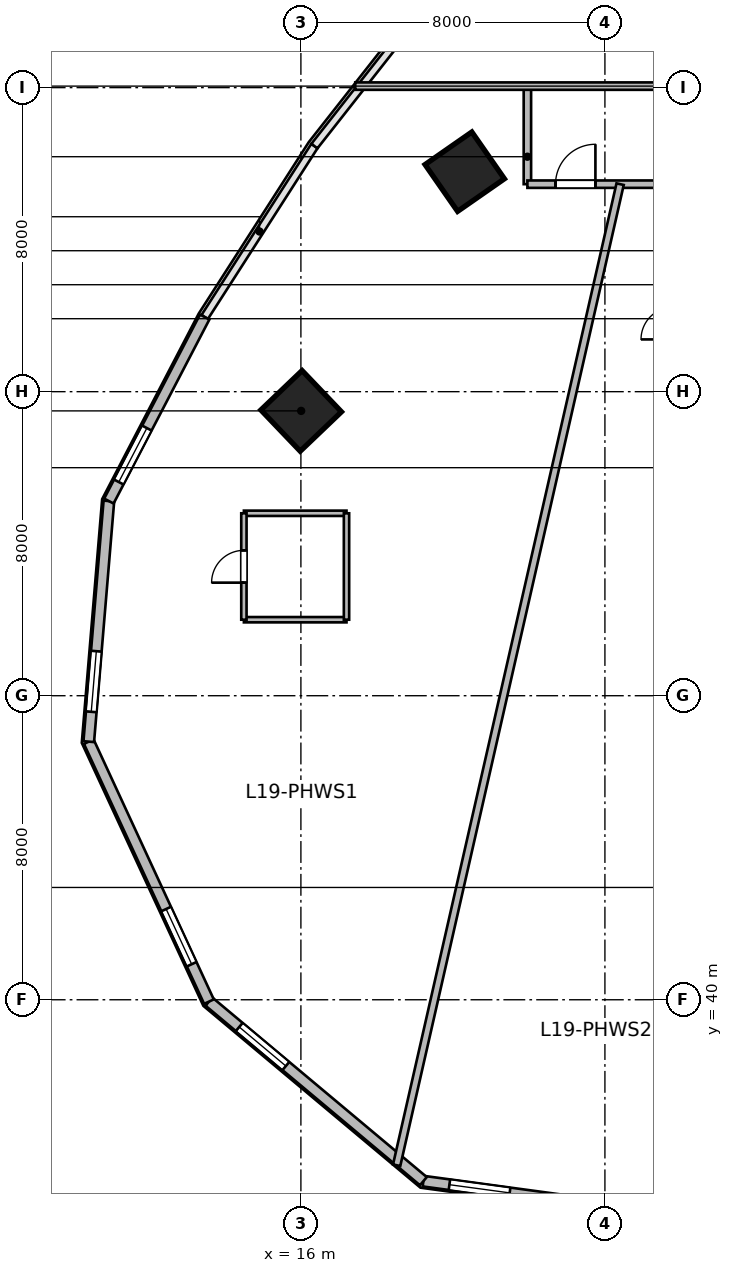
"""IFC4 building model, lengths in metres.
Left out: names, types, materials, properties, quantities, classifications, styles, units other than length and angle.
Written with IfcOpenShell. Run it as: python <this file> out.ifc"""

import sys

from ifc_helpers import new_model, si_unit, direction, frame, frame_2d, origin, origin_2d, place, context, subcontext, project, spatial, rectangle, extrude, source, transform, mapped, element, fill, save


model = new_model("IFC4")
c1 = context("Model", 3, precision=1e-05, world=origin(), true_north=direction((0.0, 1.0)))
c2 = subcontext(c1, "Body", "Model", "MODEL_VIEW")
j1 = project(units=[si_unit("LENGTHUNIT", "METRE"), si_unit("PLANEANGLEUNIT", "RADIAN")], contexts=[c1])
p1 = place(None, origin())
s1 = spatial("IfcSite", under=j1, at=p1, CompositionType="ELEMENT")
p2 = place(p1, origin())
s2 = spatial("IfcBuilding", under=s1, at=p2, CompositionType="ELEMENT")
p3 = place(p2, frame((0.0, 0.0, 82.2)))
s3 = spatial("IfcBuildingStorey", under=s2, at=p3, CompositionType="ELEMENT", Elevation=82.2)
m1 = source(origin(), c2, "Body", "SweptSolid", [
    extrude(rectangle(XDim=1.5, YDim=1.5, at=origin_2d()), origin(), (0.0, 0.0, 1.0), 3.6),
])
for number, where, z_axis, x_axis in (
    (1, (16.007, 55.494, 0.0), (0.0, 0.0, 1.0), (-0.691, 0.723, 0.0)),
    (2, (20.311, 61.789, 0.0), (0.0, 0.0, 1.0), (-0.571, 0.821, 0.0)),
):
    element("IfcColumn", number, at=place(p3, frame(where, z_axis=z_axis, x_axis=x_axis)), inside=s3, PredefinedType="COLUMN", context=c2, shape_type="MappedRepresentation", body=[
        mapped(m1, transform((0.0, 0.0, 0.0), scale=1.0)),
    ])
m2 = source(origin(), c2, "Body", "SweptSolid", [
    extrude(rectangle(XDim=5.222, YDim=0.28, at=frame_2d((2.611, 0.0))), origin(), (0.0, 0.0, 1.0), 3.28),
])
p4 = place(p3, frame((29.115, 37.807, 0.0), z_axis=(0.0, 0.0, 1.0), x_axis=(-0.761900099546, -0.647694556339, 0.0)))
e3 = element("IfcWall", 3, at=p4, inside=s3, PredefinedType="SOLIDWALL", context=c2, shape_type="MappedRepresentation", body=[
    mapped(m2, transform((0.0, 0.0, 0.0), scale=1.0)),
])
p5 = place(p4, frame((3.117, 0.0, 0.95)))
e4 = element("IfcOpeningElement", 4, at=p5, cuts=e3, PredefinedType="OPENING", context=c2, shape_type="SweptSolid", body=[
    extrude(rectangle(XDim=1.6, YDim=1.9, at=frame_2d((0.8, 0.95))), frame((0.0, 0.15, 0.0), z_axis=(0.0, -1.0, 0.0), x_axis=(1.0, 0.0, 0.0)), (0.0, 0.0, 1.0), 0.3),
])
m3 = source(origin(), c2, "Body", "SweptSolid", [
    extrude(rectangle(XDim=5.967, YDim=0.28, at=frame_2d((2.984, 0.0))), origin(), (0.0, 0.0, 1.0), 3.28),
])
p6 = place(p3, frame((25.136, 34.425, 0.0), z_axis=(0.0, 0.0, 1.0), x_axis=(-0.990927009341, 0.134401124099, 0.0)))
e5 = element("IfcWall", 5, at=p6, inside=s3, PredefinedType="SOLIDWALL", context=c2, shape_type="MappedRepresentation", body=[
    mapped(m3, transform((0.0, 0.0, 0.0), scale=1.0)),
])
p7 = place(p6, frame((3.676, 0.0, 0.95)))
e6 = element("IfcOpeningElement", 6, at=p7, cuts=e5, PredefinedType="OPENING", context=c2, shape_type="SweptSolid", body=[
    extrude(rectangle(XDim=1.6, YDim=1.9, at=frame_2d((0.8, 0.95))), frame((0.0, 0.15, 0.0), z_axis=(0.0, -1.0, 0.0), x_axis=(1.0, 0.0, 0.0)), (0.0, 0.0, 1.0), 0.3),
])
m4 = source(origin(), c2, "Body", "SweptSolid", [
    extrude(rectangle(XDim=7.359, YDim=0.28, at=frame_2d((3.679, 0.0))), origin(), (0.0, 0.0, 1.0), 3.28),
])
p8 = place(p3, frame((19.223, 35.227, 0.0), z_axis=(0.0, 0.0, 1.0), x_axis=(-0.766737165543, 0.641961150675, 0.0)))
e7 = element("IfcWall", 7, at=p8, inside=s3, PredefinedType="SOLIDWALL", context=c2, shape_type="MappedRepresentation", body=[
    mapped(m4, transform((0.0, 0.0, 0.0), scale=1.0)),
])
p9 = place(p8, frame((4.719, 0.0, 0.95)))
e8 = element("IfcOpeningElement", 8, at=p9, cuts=e7, PredefinedType="OPENING", context=c2, shape_type="SweptSolid", body=[
    extrude(rectangle(XDim=1.6, YDim=1.9, at=frame_2d((0.8, 0.95))), frame((0.0, 0.15, 0.0), z_axis=(0.0, -1.0, 0.0), x_axis=(1.0, 0.0, 0.0)), (0.0, 0.0, 1.0), 0.3),
])
m5 = source(origin(), c2, "Body", "SweptSolid", [
    extrude(rectangle(XDim=7.536, YDim=0.28, at=frame_2d((3.768, 0.0))), origin(), (0.0, 0.0, 1.0), 3.28),
])
p10 = place(p3, frame((13.58, 39.951, 0.0), z_axis=(0.0, 0.0, 1.0), x_axis=(-0.41964973873, 0.907686122393, 0.0)))
e9 = element("IfcWall", 9, at=p10, inside=s3, PredefinedType="SOLIDWALL", context=c2, shape_type="MappedRepresentation", body=[
    mapped(m5, transform((0.0, 0.0, 0.0), scale=1.0)),
])
p11 = place(p10, frame((1.084, 0.0, 0.95)))
e10 = element("IfcOpeningElement", 10, at=p11, cuts=e9, PredefinedType="OPENING", context=c2, shape_type="SweptSolid", body=[
    extrude(rectangle(XDim=1.6, YDim=1.9, at=frame_2d((0.8, 0.95))), frame((0.0, 0.15, 0.0), z_axis=(0.0, -1.0, 0.0), x_axis=(1.0, 0.0, 0.0)), (0.0, 0.0, 1.0), 0.3),
])
m6 = source(origin(), c2, "Body", "SweptSolid", [
    extrude(rectangle(XDim=6.353, YDim=0.28, at=frame_2d((3.176, 0.0))), origin(), (0.0, 0.0, 1.0), 3.28),
])
p12 = place(p3, frame((10.418, 46.792, 0.0), z_axis=(0.0, 0.0, 1.0), x_axis=(0.083319001377, 0.996522926986, 0.0)))
e11 = element("IfcWall", 11, at=p12, inside=s3, PredefinedType="SOLIDWALL", context=c2, shape_type="MappedRepresentation", body=[
    mapped(m6, transform((0.0, 0.0, 0.0), scale=1.0)),
])
p13 = place(p12, frame((0.788, 0.0, 0.95)))
e12 = element("IfcOpeningElement", 12, at=p13, cuts=e11, PredefinedType="OPENING", context=c2, shape_type="SweptSolid", body=[
    extrude(rectangle(XDim=1.6, YDim=1.9, at=frame_2d((0.8, 0.95))), frame((0.0, 0.15, 0.0), z_axis=(0.0, -1.0, 0.0), x_axis=(1.0, 0.0, 0.0)), (0.0, 0.0, 1.0), 0.3),
])
m7 = source(origin(), c2, "Body", "SweptSolid", [
    extrude(rectangle(XDim=5.459, YDim=0.28, at=frame_2d((2.73, 0.0))), origin(), (0.0, 0.0, 1.0), 3.28),
])
p14 = place(p3, frame((10.947, 53.122, 0.0), z_axis=(0.0, 0.0, 1.0), x_axis=(0.461768054321, 0.887000712518, 0.0)))
e13 = element("IfcWall", 13, at=p14, inside=s3, PredefinedType="SOLIDWALL", context=c2, shape_type="MappedRepresentation", body=[
    mapped(m7, transform((0.0, 0.0, 0.0), scale=1.0)),
])
p15 = place(p14, frame((0.565, 0.0, 0.95)))
e14 = element("IfcOpeningElement", 14, at=p15, cuts=e13, PredefinedType="OPENING", context=c2, shape_type="SweptSolid", body=[
    extrude(rectangle(XDim=1.6, YDim=1.9, at=frame_2d((0.8, 0.95))), frame((0.0, 0.15, 0.0), z_axis=(0.0, -1.0, 0.0), x_axis=(1.0, 0.0, 0.0)), (0.0, 0.0, 1.0), 0.3),
])
m8 = source(origin(), c2, "Body", "SweptSolid", [
    extrude(rectangle(XDim=2.58, YDim=0.195, at=frame_2d((1.29, 0.0))), origin(), (0.0, 0.0, 1.0), 3.28),
])
p16 = place(p3, frame((21.96, 61.46, 0.0), z_axis=(0.0, 0.0, 1.0), x_axis=(0.0, 1.0, 0.0)))
e15 = element("IfcWall", 15, at=p16, inside=s3, PredefinedType="PARTITIONING", context=c2, shape_type="MappedRepresentation", body=[
    mapped(m8, transform((0.0, 0.0, 0.0), scale=1.0)),
])
m9 = source(origin(), c2, "Body", "SweptSolid", [
    extrude(rectangle(XDim=16.93, YDim=0.195, at=frame_2d((8.465, 0.0))), origin(), (0.0, 0.0, 1.0), 3.28),
])
p17 = place(p3, frame((17.43, 64.04, 0.0), z_axis=(0.0, 0.0, 1.0), x_axis=(1.0, 0.0, 0.0)))
e16 = element("IfcWall", 16, at=p17, inside=s3, PredefinedType="PARTITIONING", context=c2, shape_type="MappedRepresentation", body=[
    mapped(m9, transform((0.0, 0.0, 0.0), scale=1.0)),
])
p18 = place(p17, frame((7.94, 0.0, 0.0)))
e17 = element("IfcOpeningElement", 17, at=p18, cuts=e16, PredefinedType="OPENING", context=c2, shape_type="SweptSolid", body=[
    extrude(rectangle(XDim=1.05, YDim=2.15, at=frame_2d((0.525, 1.075))), frame((0.0, 0.107, 0.0), z_axis=(0.0, -1.0, 0.0), x_axis=(1.0, 0.0, 0.0)), (0.0, 0.0, 1.0), 0.215),
])
m10 = source(origin(), c2, "Body", "SweptSolid", [
    extrude(rectangle(XDim=12.4, YDim=0.195, at=frame_2d((6.2, 0.0))), origin(), (0.0, 0.0, 1.0), 3.28),
])
p19 = place(p3, frame((21.96, 61.46, 0.0), z_axis=(0.0, 0.0, 1.0), x_axis=(1.0, 0.0, 0.0)))
e18 = element("IfcWall", 18, at=p19, inside=s3, PredefinedType="PARTITIONING", context=c2, shape_type="MappedRepresentation", body=[
    mapped(m10, transform((0.0, 0.0, 0.0), scale=1.0)),
])
p20 = place(p19, frame((0.74, 0.0, 0.0)))
e19 = element("IfcOpeningElement", 19, at=p20, cuts=e18, PredefinedType="OPENING", context=c2, shape_type="SweptSolid", body=[
    extrude(rectangle(XDim=1.05, YDim=2.15, at=frame_2d((0.525, 1.075))), frame((0.0, 0.107, 0.0), z_axis=(0.0, -1.0, 0.0), x_axis=(1.0, 0.0, 0.0)), (0.0, 0.0, 1.0), 0.215),
])
p21 = place(p19, frame((5.675, 0.0, 0.0)))
e20 = element("IfcOpeningElement", 20, at=p21, cuts=e18, PredefinedType="OPENING", context=c2, shape_type="SweptSolid", body=[
    extrude(rectangle(XDim=1.05, YDim=2.15, at=frame_2d((0.525, 1.075))), frame((0.0, 0.107, 0.0), z_axis=(0.0, -1.0, 0.0), x_axis=(1.0, 0.0, 0.0)), (0.0, 0.0, 1.0), 0.215),
])
p22 = place(p19, frame((7.74, 0.0, 0.0)))
e21 = element("IfcOpeningElement", 21, at=p22, cuts=e18, PredefinedType="OPENING", context=c2, shape_type="SweptSolid", body=[
    extrude(rectangle(XDim=1.05, YDim=2.15, at=frame_2d((0.525, 1.075))), frame((0.0, 0.107, 0.0), z_axis=(0.0, -1.0, 0.0), x_axis=(1.0, 0.0, 0.0)), (0.0, 0.0, 1.0), 0.215),
])
m11 = source(origin(), c2, "Body", "SweptSolid", [
    extrude(rectangle(XDim=26.476, YDim=0.195, at=frame_2d((13.238, 0.0))), origin(), (0.0, 0.0, 1.0), 2.847),
])
p23 = place(p3, frame((18.52, 35.646, 0.0), z_axis=(0.0, 0.0, 1.0), x_axis=(0.22210613157, 0.975022495289, 0.0)))
e22 = element("IfcWall", 22, at=p23, inside=s3, PredefinedType="PARTITIONING", context=c2, shape_type="MappedRepresentation", body=[
    mapped(m11, transform((0.0, 0.0, 0.0), scale=1.0)),
])
m12 = source(origin(), c2, "Body", "SweptSolid", [
    extrude(rectangle(XDim=2.7, YDim=0.14, at=frame_2d((1.35, 0.0))), origin(), (0.0, 0.0, 1.0), 3.28),
])
for number, where, z_axis, x_axis in (
    (23, (14.5, 52.8, 0.0), (0.0, 0.0, 1.0), (1.0, 0.0, 0.0)),
    (24, (14.5, 50.0, 0.0), (0.0, 0.0, 1.0), (1.0, 0.0, 0.0)),
):
    element("IfcWall", number, at=place(p3, frame(where, z_axis=z_axis, x_axis=x_axis)), inside=s3, PredefinedType="PARTITIONING", context=c2, shape_type="MappedRepresentation", body=[
        mapped(m12, transform((0.0, 0.0, 0.0), scale=1.0)),
    ])
m13 = source(origin(), c2, "Body", "SweptSolid", [
    extrude(rectangle(XDim=2.8, YDim=0.14, at=frame_2d((1.4, 0.0))), origin(), (0.0, 0.0, 1.0), 3.28),
])
p24 = place(p3, frame((14.5, 50.0, 0.0), z_axis=(0.0, 0.0, 1.0), x_axis=(0.0, 1.0, 0.0)))
e25 = element("IfcWall", 25, at=p24, inside=s3, PredefinedType="PARTITIONING", context=c2, shape_type="MappedRepresentation", body=[
    mapped(m13, transform((0.0, 0.0, 0.0), scale=1.0)),
])
p25 = place(p24, frame((0.975, 0.0, 0.0)))
e26 = element("IfcOpeningElement", 26, at=p25, cuts=e25, PredefinedType="OPENING", context=c2, shape_type="SweptSolid", body=[
    extrude(rectangle(XDim=0.85, YDim=2.05, at=frame_2d((0.425, 1.025))), frame((0.0, 0.08, 0.0), z_axis=(0.0, -1.0, 0.0), x_axis=(1.0, 0.0, 0.0)), (0.0, 0.0, 1.0), 0.16),
])
p26 = place(p3, frame((17.2, 50.0, 0.0), z_axis=(0.0, 0.0, 1.0), x_axis=(0.0, 1.0, 0.0)))
e27 = element("IfcWall", 27, at=p26, inside=s3, PredefinedType="PARTITIONING", context=c2, shape_type="MappedRepresentation", body=[
    mapped(m13, transform((0.0, 0.0, 0.0), scale=1.0)),
])
m14 = source(origin(), c2, "Body", "SweptSolid", [
    extrude(rectangle(XDim=1.6, YDim=1.9, at=frame_2d((0.8, 0.95))), frame((0.0, 0.03, 0.0), z_axis=(0.0, -1.0, 0.0), x_axis=(1.0, 0.0, 0.0)), (0.0, 0.0, 1.0), 0.06),
])
p27 = place(p7, origin())
e28 = element("IfcWindow", 28, at=p27, inside=s3, PartitioningType="SINGLE_PANEL", PredefinedType="WINDOW", context=c2, shape_type="MappedRepresentation", body=[
    mapped(m14, transform((0.0, 0.0, 0.0), scale=1.0)),
])
fill(e6, e28)
p28 = place(p9, origin())
e29 = element("IfcWindow", 29, at=p28, inside=s3, PartitioningType="SINGLE_PANEL", PredefinedType="WINDOW", context=c2, shape_type="MappedRepresentation", body=[
    mapped(m14, transform((0.0, 0.0, 0.0), scale=1.0)),
])
fill(e8, e29)
p29 = place(p11, origin())
e30 = element("IfcWindow", 30, at=p29, inside=s3, PartitioningType="SINGLE_PANEL", PredefinedType="WINDOW", context=c2, shape_type="MappedRepresentation", body=[
    mapped(m14, transform((0.0, 0.0, 0.0), scale=1.0)),
])
fill(e10, e30)
p30 = place(p13, origin())
e31 = element("IfcWindow", 31, at=p30, inside=s3, PartitioningType="SINGLE_PANEL", PredefinedType="WINDOW", context=c2, shape_type="MappedRepresentation", body=[
    mapped(m14, transform((0.0, 0.0, 0.0), scale=1.0)),
])
fill(e12, e31)
p31 = place(p15, origin())
e32 = element("IfcWindow", 32, at=p31, inside=s3, PartitioningType="SINGLE_PANEL", PredefinedType="WINDOW", context=c2, shape_type="MappedRepresentation", body=[
    mapped(m14, transform((0.0, 0.0, 0.0), scale=1.0)),
])
fill(e14, e32)
m15 = source(origin(), c2, "Body", "SweptSolid", [
    extrude(rectangle(XDim=1.05, YDim=2.15, at=frame_2d((0.525, 1.075))), frame((0.0, 0.025, 0.0), z_axis=(0.0, -1.0, 0.0), x_axis=(1.0, 0.0, 0.0)), (0.0, 0.0, 1.0), 0.05),
])
p32 = place(p20, origin())
e33 = element("IfcDoor", 33, at=p32, inside=s3, OperationType="SINGLE_SWING_RIGHT", PredefinedType="DOOR", context=c2, shape_type="MappedRepresentation", body=[
    mapped(m15, transform((0.0, 0.0, 0.0), scale=1.0)),
])
fill(e19, e33)
m16 = source(origin(), c2, "Body", "SweptSolid", [
    extrude(rectangle(XDim=0.85, YDim=2.05, at=frame_2d((0.425, 1.025))), frame((0.0, 0.025, 0.0), z_axis=(0.0, -1.0, 0.0), x_axis=(1.0, 0.0, 0.0)), (0.0, 0.0, 1.0), 0.05),
])
p33 = place(p25, origin())
e34 = element("IfcDoor", 34, at=p33, inside=s3, OperationType="SINGLE_SWING_LEFT", PredefinedType="DOOR", context=c2, shape_type="MappedRepresentation", body=[
    mapped(m16, transform((0.0, 0.0, 0.0), scale=1.0)),
])
fill(e26, e34)
save(model, sys.argv[1])
